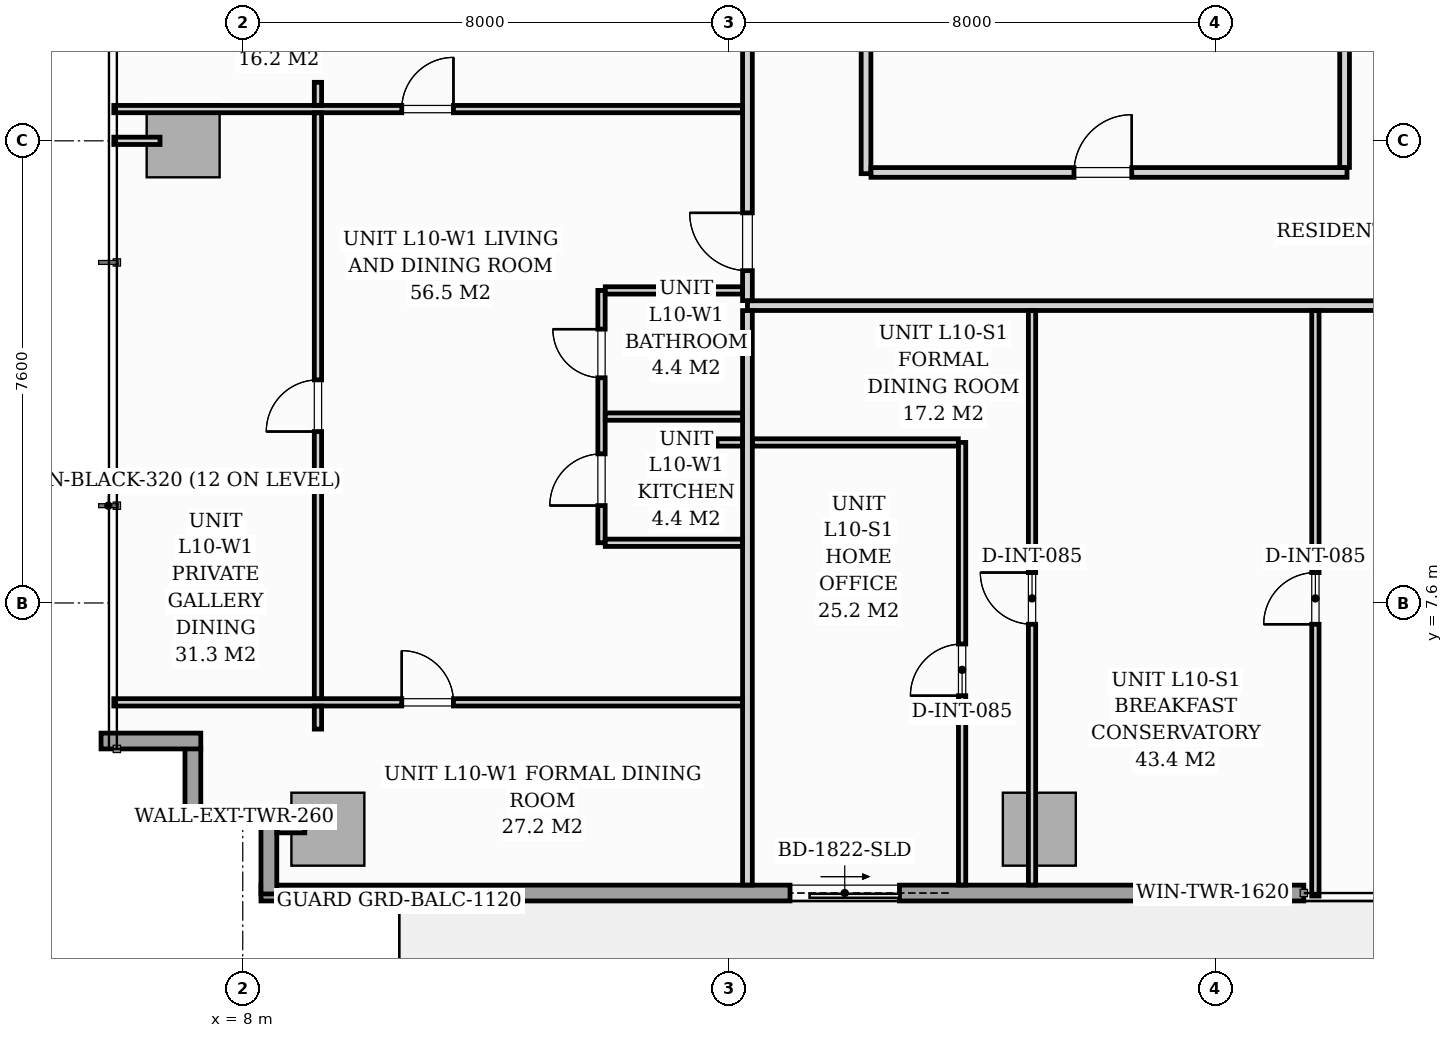
"""IFC4 building model, lengths in metres.
Left out: names, types, materials, properties, quantities, classifications, styles, units other than length and angle.
Written with IfcOpenShell. Run it as: python <this file> out.ifc"""

import sys

from ifc_helpers import new_model, si_unit, direction, frame, frame_2d, origin, origin_2d, place, context, subcontext, project, spatial, rectangle, extrude, source, transform, mapped, element, fill, save


model = new_model("IFC4")
c1 = context("Model", 3, precision=1e-05, world=origin(), true_north=direction((0.0, 1.0)))
c2 = subcontext(c1, "Body", "Model", "MODEL_VIEW")
j1 = project(units=[si_unit("LENGTHUNIT", "METRE"), si_unit("PLANEANGLEUNIT", "RADIAN")], contexts=[c1])
p1 = place(None, origin())
s1 = spatial("IfcSite", under=j1, at=p1, CompositionType="ELEMENT")
p2 = place(p1, origin())
s2 = spatial("IfcBuilding", under=s1, at=p2, CompositionType="ELEMENT")
p3 = place(p2, frame((0.0, 0.0, 39.0)))
s3 = spatial("IfcBuildingStorey", under=s2, at=p3, CompositionType="ELEMENT", Elevation=39.0)
m1 = source(origin(), c2, "Body", "SweptSolid", [
    extrude(rectangle(XDim=1.2, YDim=1.2, at=origin_2d()), origin(), (0.0, 0.0, 1.0), 3.196),
])
for number, where, z_axis, x_axis in (
    (1, (9.4, 3.88, 0.002), (0.0, 0.0, 1.0), (1.0, 0.0, 0.0)),
    (2, (21.1, 3.88, 0.002), (0.0, 0.0, 1.0), (1.0, 0.0, 0.0)),
    (3, (7.02, 15.2, 0.002), (0.0, 0.0, 1.0), (1.0, 0.0, 0.0)),
):
    element("IfcColumn", number, at=place(p3, frame(where, z_axis=z_axis, x_axis=x_axis)), inside=s3, PredefinedType="COLUMN", context=c2, shape_type="MappedRepresentation", body=[
        mapped(m1, transform((0.0, 0.0, 0.0), scale=1.0)),
    ])
p4 = place(p3, frame((8.798, 4.08, 0.0), z_axis=(0.0, 0.0, 1.0), x_axis=(-1.0, 0.0, 0.0)))
e4 = element("IfcWall", 4, at=p4, inside=s3, PredefinedType="STANDARD", context=c2, shape_type="SweptSolid", body=[
    extrude(rectangle(XDim=1.878, YDim=0.26, at=frame_2d((0.939, 0.0))), origin(), (0.0, 0.0, 1.0), 2.94),
])
p5 = place(p3, frame((7.18, 4.065, 0.0), z_axis=(0.0, 0.0, 1.0), x_axis=(0.0, 1.0, 0.0)))
e5 = element("IfcWall", 5, at=p5, inside=s3, PredefinedType="STANDARD", context=c2, shape_type="SweptSolid", body=[
    extrude(rectangle(XDim=1.15, YDim=0.26, at=frame_2d((0.575, 0.0))), origin(), (0.0, 0.0, 1.0), 2.94),
])
p6 = place(p3, frame((7.31, 5.33, 0.0), z_axis=(0.0, 0.0, 1.0), x_axis=(-1.0, 0.0, 0.0)))
e6 = element("IfcWall", 6, at=p6, inside=s3, PredefinedType="STANDARD", context=c2, shape_type="SweptSolid", body=[
    extrude(rectangle(XDim=1.64, YDim=0.26, at=frame_2d((0.82, 0.0))), origin(), (0.0, 0.0, 1.0), 2.94),
])
p7 = place(p3, frame((25.45, 2.83, 0.0), z_axis=(0.0, 0.0, 1.0), x_axis=(-1.0, 0.0, 0.0)))
e7 = element("IfcWall", 7, at=p7, inside=s3, PredefinedType="STANDARD", context=c2, shape_type="SweptSolid", body=[
    extrude(rectangle(XDim=17.15, YDim=0.26, at=frame_2d((8.575, 0.0))), origin(), (0.0, 0.0, 1.0), 2.94),
])
p8 = place(p7, frame((6.65, 0.0, 0.0)))
e8 = element("IfcOpeningElement", 8, at=p8, cuts=e7, PredefinedType="OPENING", context=c2, shape_type="SweptSolid", body=[
    extrude(rectangle(XDim=1.8, YDim=2.06, at=frame_2d((0.9, 1.03))), frame((0.0, 0.14, 0.0), z_axis=(0.0, -1.0, 0.0), x_axis=(1.0, 0.0, 0.0)), (0.0, 0.0, 1.0), 0.28),
])
p9 = place(p7, frame((0.7, 0.0, 0.65)))
e9 = element("IfcOpeningElement", 9, at=p9, cuts=e7, PredefinedType="OPENING", context=c2, shape_type="SweptSolid", body=[
    extrude(rectangle(XDim=1.6, YDim=1.5, at=frame_2d((0.8, 0.75))), frame((0.0, 0.14, 0.0), z_axis=(0.0, -1.0, 0.0), x_axis=(1.0, 0.0, 0.0)), (0.0, 0.0, 1.0), 0.28),
])
p10 = place(p3, frame((8.43, 2.815, 0.0), z_axis=(0.0, 0.0, 1.0), x_axis=(0.0, 1.0, 0.0)))
e10 = element("IfcWall", 10, at=p10, inside=s3, PredefinedType="STANDARD", context=c2, shape_type="SweptSolid", body=[
    extrude(rectangle(XDim=1.395, YDim=0.26, at=frame_2d((0.698, 0.0))), origin(), (0.0, 0.0, 1.0), 2.94),
])
p11 = place(p3, frame((16.3, 12.49, 0.0), z_axis=(0.0, 0.0, 1.0), x_axis=(1.0, 0.0, 0.0)))
e11 = element("IfcWall", 11, at=p11, inside=s3, PredefinedType="PARTITIONING", context=c2, shape_type="SweptSolid", body=[
    extrude(rectangle(XDim=35.2, YDim=0.16, at=frame_2d((17.6, 0.0))), origin(), (0.0, 0.0, 1.0), 2.94),
])
p12 = place(p11, frame((11.072, 0.0, 0.0)))
e12 = element("IfcOpeningElement", 12, at=p12, cuts=e11, PredefinedType="OPENING", context=c2, shape_type="SweptSolid", body=[
    extrude(rectangle(XDim=0.95, YDim=2.06, at=frame_2d((0.475, 1.03))), frame((0.0, 0.09, 0.0), z_axis=(0.0, -1.0, 0.0), x_axis=(1.0, 0.0, 0.0)), (0.0, 0.0, 1.0), 0.18),
])
p13 = place(p11, frame((24.032, 0.0, 0.0)))
e13 = element("IfcOpeningElement", 13, at=p13, cuts=e11, PredefinedType="OPENING", context=c2, shape_type="SweptSolid", body=[
    extrude(rectangle(XDim=0.95, YDim=2.06, at=frame_2d((0.475, 1.03))), frame((0.0, 0.09, 0.0), z_axis=(0.0, -1.0, 0.0), x_axis=(1.0, 0.0, 0.0)), (0.0, 0.0, 1.0), 0.18),
])
p14 = place(p3, frame((16.3, 2.962, 0.0), z_axis=(0.0, 0.0, 1.0), x_axis=(0.0, 1.0, 0.0)))
e14 = element("IfcWall", 14, at=p14, inside=s3, PredefinedType="PARTITIONING", context=c2, shape_type="SweptSolid", body=[
    extrude(rectangle(XDim=9.446, YDim=0.16, at=frame_2d((4.723, 0.0))), origin(), (0.0, 0.0, 1.0), 2.94),
])
p15 = place(p3, frame((16.3, 12.572, 0.0), z_axis=(0.0, 0.0, 1.0), x_axis=(0.0, 1.0, 0.0)))
e15 = element("IfcWall", 15, at=p15, inside=s3, PredefinedType="PARTITIONING", context=c2, shape_type="SweptSolid", body=[
    extrude(rectangle(XDim=14.866, YDim=0.16, at=frame_2d((7.433, 0.0))), origin(), (0.0, 0.0, 1.0), 2.94),
])
p16 = place(p15, frame((0.493, 0.0, 0.0)))
e16 = element("IfcOpeningElement", 16, at=p16, cuts=e15, PredefinedType="OPENING", context=c2, shape_type="SweptSolid", body=[
    extrude(rectangle(XDim=0.95, YDim=2.06, at=frame_2d((0.475, 1.03))), frame((0.0, 0.09, 0.0), z_axis=(0.0, -1.0, 0.0), x_axis=(1.0, 0.0, 0.0)), (0.0, 0.0, 1.0), 0.18),
])
p17 = place(p15, frame((5.473, 0.0, 0.0)))
e17 = element("IfcOpeningElement", 17, at=p17, cuts=e15, PredefinedType="OPENING", context=c2, shape_type="SweptSolid", body=[
    extrude(rectangle(XDim=0.95, YDim=2.06, at=frame_2d((0.475, 1.03))), frame((0.0, 0.09, 0.0), z_axis=(0.0, -1.0, 0.0), x_axis=(1.0, 0.0, 0.0)), (0.0, 0.0, 1.0), 0.18),
])
p18 = place(p3, frame((19.83, 2.962, 0.0), z_axis=(0.0, 0.0, 1.0), x_axis=(0.0, 1.0, 0.0)))
e18 = element("IfcWall", 18, at=p18, inside=s3, PredefinedType="PARTITIONING", context=c2, shape_type="SweptSolid", body=[
    extrude(rectangle(XDim=7.278, YDim=0.12, at=frame_2d((3.639, 0.0))), origin(), (0.0, 0.0, 1.0), 2.94),
])
p19 = place(p18, frame((3.113, 0.0, 0.0)))
e19 = element("IfcOpeningElement", 19, at=p19, cuts=e18, PredefinedType="OPENING", context=c2, shape_type="SweptSolid", body=[
    extrude(rectangle(XDim=0.85, YDim=2.05, at=frame_2d((0.425, 1.025))), frame((0.0, 0.07, 0.0), z_axis=(0.0, -1.0, 0.0), x_axis=(1.0, 0.0, 0.0)), (0.0, 0.0, 1.0), 0.14),
])
p20 = place(p3, frame((15.8, 10.24, 0.0), z_axis=(0.0, 0.0, 1.0), x_axis=(1.0, 0.0, 0.0)))
e20 = element("IfcWall", 20, at=p20, inside=s3, PredefinedType="PARTITIONING", context=c2, shape_type="SweptSolid", body=[
    extrude(rectangle(XDim=0.418, YDim=0.12, at=frame_2d((0.209, 0.0))), origin(), (0.0, 0.0, 1.0), 2.94),
])
p21 = place(p3, frame((16.382, 10.24, 0.0), z_axis=(0.0, 0.0, 1.0), x_axis=(1.0, 0.0, 0.0)))
e21 = element("IfcWall", 21, at=p21, inside=s3, PredefinedType="PARTITIONING", context=c2, shape_type="SweptSolid", body=[
    extrude(rectangle(XDim=3.386, YDim=0.12, at=frame_2d((1.693, 0.0))), origin(), (0.0, 0.0, 1.0), 2.94),
])
p22 = place(p3, frame((20.98, 2.962, 0.0), z_axis=(0.0, 0.0, 1.0), x_axis=(0.0, 1.0, 0.0)))
e22 = element("IfcWall", 22, at=p22, inside=s3, PredefinedType="PARTITIONING", context=c2, shape_type="SweptSolid", body=[
    extrude(rectangle(XDim=9.446, YDim=0.12, at=frame_2d((4.723, 0.0))), origin(), (0.0, 0.0, 1.0), 2.94),
])
p23 = place(p22, frame((4.288, 0.0, 0.0)))
e23 = element("IfcOpeningElement", 23, at=p23, cuts=e22, PredefinedType="OPENING", context=c2, shape_type="SweptSolid", body=[
    extrude(rectangle(XDim=0.85, YDim=2.05, at=frame_2d((0.425, 1.025))), frame((0.0, 0.07, 0.0), z_axis=(0.0, -1.0, 0.0), x_axis=(1.0, 0.0, 0.0)), (0.0, 0.0, 1.0), 0.14),
])
p24 = place(p3, frame((25.64, 2.78, 0.0), z_axis=(0.0, 0.0, 1.0), x_axis=(0.0, 1.0, 0.0)))
e24 = element("IfcWall", 24, at=p24, inside=s3, PredefinedType="PARTITIONING", context=c2, shape_type="SweptSolid", body=[
    extrude(rectangle(XDim=9.628, YDim=0.12, at=frame_2d((4.814, 0.0))), origin(), (0.0, 0.0, 1.0), 2.94),
])
p25 = place(p24, frame((4.47, 0.0, 0.0)))
e25 = element("IfcOpeningElement", 25, at=p25, cuts=e24, PredefinedType="OPENING", context=c2, shape_type="SweptSolid", body=[
    extrude(rectangle(XDim=0.85, YDim=2.05, at=frame_2d((0.425, 1.025))), frame((0.0, 0.07, 0.0), z_axis=(0.0, -1.0, 0.0), x_axis=(1.0, 0.0, 0.0)), (0.0, 0.0, 1.0), 0.14),
])
p26 = place(p3, frame((13.9, 8.59, 0.0), z_axis=(0.0, 0.0, 1.0), x_axis=(0.0, 1.0, 0.0)))
e26 = element("IfcWall", 26, at=p26, inside=s3, PredefinedType="PARTITIONING", context=c2, shape_type="SweptSolid", body=[
    extrude(rectangle(XDim=4.15, YDim=0.12, at=frame_2d((2.075, 0.0))), origin(), (0.0, 0.0, 1.0), 2.94),
])
p27 = place(p26, frame((0.612, 0.0, 0.0)))
e27 = element("IfcOpeningElement", 27, at=p27, cuts=e26, PredefinedType="OPENING", context=c2, shape_type="SweptSolid", body=[
    extrude(rectangle(XDim=0.85, YDim=2.05, at=frame_2d((0.425, 1.025))), frame((0.0, 0.07, 0.0), z_axis=(0.0, -1.0, 0.0), x_axis=(1.0, 0.0, 0.0)), (0.0, 0.0, 1.0), 0.14),
])
p28 = place(p26, frame((2.713, 0.0, 0.0)))
e28 = element("IfcOpeningElement", 28, at=p28, cuts=e26, PredefinedType="OPENING", context=c2, shape_type="SweptSolid", body=[
    extrude(rectangle(XDim=0.8, YDim=2.02, at=frame_2d((0.4, 1.01))), frame((0.0, 0.07, 0.0), z_axis=(0.0, -1.0, 0.0), x_axis=(1.0, 0.0, 0.0)), (0.0, 0.0, 1.0), 0.14),
])
for number, where, z_axis, x_axis in (
    (29, (13.962, 10.665, 0.0), (0.0, 0.0, 1.0), (1.0, 0.0, 0.0)),
    (30, (13.962, 8.59, 0.0), (0.0, 0.0, 1.0), (1.0, 0.0, 0.0)),
    (31, (13.962, 12.74, 0.0), (0.0, 0.0, 1.0), (1.0, 0.0, 0.0)),
):
    element("IfcWall", number, at=place(p3, frame(where, z_axis=z_axis, x_axis=x_axis)), inside=s3, PredefinedType="PARTITIONING", context=c2, shape_type="SweptSolid", body=[
        extrude(rectangle(XDim=2.256, YDim=0.12, at=frame_2d((1.128, 0.0))), origin(), (0.0, 0.0, 1.0), 2.94),
    ])
p29 = place(p3, frame((5.88, 5.966, 0.0), z_axis=(0.0, 0.0, 1.0), x_axis=(1.0, 0.0, 0.0)))
e32 = element("IfcWall", 32, at=p29, inside=s3, PredefinedType="PARTITIONING", context=c2, shape_type="SweptSolid", body=[
    extrude(rectangle(XDim=10.338, YDim=0.12, at=frame_2d((5.169, 0.0))), origin(), (0.0, 0.0, 1.0), 2.94),
])
p30 = place(p29, frame((4.735, 0.0, 0.0)))
e33 = element("IfcOpeningElement", 33, at=p30, cuts=e32, PredefinedType="OPENING", context=c2, shape_type="SweptSolid", body=[
    extrude(rectangle(XDim=0.85, YDim=2.05, at=frame_2d((0.425, 1.025))), frame((0.0, 0.07, 0.0), z_axis=(0.0, -1.0, 0.0), x_axis=(1.0, 0.0, 0.0)), (0.0, 0.0, 1.0), 0.14),
])
p31 = place(p3, frame((5.88, 15.722, 0.0), z_axis=(0.0, 0.0, 1.0), x_axis=(1.0, 0.0, 0.0)))
e34 = element("IfcWall", 34, at=p31, inside=s3, PredefinedType="PARTITIONING", context=c2, shape_type="SweptSolid", body=[
    extrude(rectangle(XDim=10.338, YDim=0.12, at=frame_2d((5.169, 0.0))), origin(), (0.0, 0.0, 1.0), 2.045),
])
p32 = place(p31, frame((4.735, 0.0, 0.0)))
e35 = element("IfcOpeningElement", 35, at=p32, cuts=e34, PredefinedType="OPENING", context=c2, shape_type="SweptSolid", body=[
    extrude(rectangle(XDim=0.85, YDim=2.01, at=frame_2d((0.425, 1.005))), frame((0.0, 0.07, 0.0), z_axis=(0.0, -1.0, 0.0), x_axis=(1.0, 0.0, 0.0)), (0.0, 0.0, 1.0), 0.14),
])
p33 = place(p3, frame((9.237, 5.526, 0.0), z_axis=(0.0, 0.0, 1.0), x_axis=(0.0, 1.0, 0.0)))
e36 = element("IfcWall", 36, at=p33, inside=s3, PredefinedType="PARTITIONING", context=c2, shape_type="SweptSolid", body=[
    extrude(rectangle(XDim=0.378, YDim=0.12, at=frame_2d((0.189, 0.0))), origin(), (0.0, 0.0, 1.0), 2.94),
])
p34 = place(p3, frame((9.237, 6.028, 0.0), z_axis=(0.0, 0.0, 1.0), x_axis=(0.0, 1.0, 0.0)))
e37 = element("IfcWall", 37, at=p34, inside=s3, PredefinedType="PARTITIONING", context=c2, shape_type="SweptSolid", body=[
    extrude(rectangle(XDim=9.632, YDim=0.12, at=frame_2d((4.816, 0.0))), origin(), (0.0, 0.0, 1.0), 2.94),
])
p35 = place(p34, frame((4.391, 0.0, 0.0)))
e38 = element("IfcOpeningElement", 38, at=p35, cuts=e37, PredefinedType="OPENING", context=c2, shape_type="SweptSolid", body=[
    extrude(rectangle(XDim=0.85, YDim=2.05, at=frame_2d((0.425, 1.025))), frame((0.0, 0.07, 0.0), z_axis=(0.0, -1.0, 0.0), x_axis=(1.0, 0.0, 0.0)), (0.0, 0.0, 1.0), 0.14),
])
p36 = place(p3, frame((9.237, 15.784, 0.0), z_axis=(0.0, 0.0, 1.0), x_axis=(0.0, 1.0, 0.0)))
e39 = element("IfcWall", 39, at=p36, inside=s3, PredefinedType="PARTITIONING", context=c2, shape_type="SweptSolid", body=[
    extrude(rectangle(XDim=0.378, YDim=0.12, at=frame_2d((0.189, 0.0))), origin(), (0.0, 0.0, 1.0), 2.94),
])
p37 = place(p3, frame((18.25, 14.66, 0.0), z_axis=(0.0, 0.0, 1.0), x_axis=(0.0, 1.0, 0.0)))
e40 = element("IfcWall", 40, at=p37, inside=s3, PredefinedType="PARTITIONING", context=c2, shape_type="SweptSolid", body=[
    extrude(rectangle(XDim=5.99, YDim=0.16, at=frame_2d((2.995, 0.0))), origin(), (0.0, 0.0, 1.0), 2.94),
])
p38 = place(p3, frame((18.332, 14.68, 0.0), z_axis=(0.0, 0.0, 1.0), x_axis=(1.0, 0.0, 0.0)))
e41 = element("IfcWall", 41, at=p38, inside=s3, PredefinedType="PARTITIONING", context=c2, shape_type="SweptSolid", body=[
    extrude(rectangle(XDim=7.828, YDim=0.16, at=frame_2d((3.914, 0.0))), origin(), (0.0, 0.0, 1.0), 2.94),
])
p39 = place(p38, frame((3.338, 0.0, 0.0)))
e42 = element("IfcOpeningElement", 42, at=p39, cuts=e41, PredefinedType="OPENING", context=c2, shape_type="SweptSolid", body=[
    extrude(rectangle(XDim=0.95, YDim=2.06, at=frame_2d((0.475, 1.03))), frame((0.0, 0.09, 0.0), z_axis=(0.0, -1.0, 0.0), x_axis=(1.0, 0.0, 0.0)), (0.0, 0.0, 1.0), 0.18),
])
p40 = place(p3, frame((26.12, 14.762, 0.0), z_axis=(0.0, 0.0, 1.0), x_axis=(0.0, 1.0, 0.0)))
e43 = element("IfcWall", 43, at=p40, inside=s3, PredefinedType="PARTITIONING", context=c2, shape_type="SweptSolid", body=[
    extrude(rectangle(XDim=2.236, YDim=0.16, at=frame_2d((1.118, 0.0))), origin(), (0.0, 0.0, 1.0), 2.94),
])
p41 = place(p3, frame((9.02, 3.88, 0.0), z_axis=(0.0, 0.0, 1.0), x_axis=(-1.0, 0.0, 0.0)))
e44 = element("IfcWall", 44, at=p41, inside=s3, PredefinedType="PARTITIONING", context=c2, shape_type="SweptSolid", body=[
    extrude(rectangle(XDim=0.458, YDim=0.12, at=frame_2d((0.229, 0.0))), origin(), (0.0, 0.0, 1.0), 2.94),
])
p42 = place(p3, frame((6.64, 15.2, 0.0), z_axis=(0.0, 0.0, 1.0), x_axis=(-1.0, 0.0, 0.0)))
e45 = element("IfcWall", 45, at=p42, inside=s3, PredefinedType="PARTITIONING", context=c2, shape_type="SweptSolid", body=[
    extrude(rectangle(XDim=0.76, YDim=0.12, at=frame_2d((0.38, 0.0))), origin(), (0.0, 0.0, 1.0), 2.94),
])
m2 = source(origin(), c2, "Body", "SweptSolid", [
    extrude(rectangle(XDim=1.8, YDim=2.06, at=frame_2d((0.9, 1.03))), frame((0.0, 0.025, 0.0), z_axis=(0.0, -1.0, 0.0), x_axis=(1.0, 0.0, 0.0)), (0.0, 0.0, 1.0), 0.05),
])
p43 = place(p8, origin())
e46 = element("IfcDoor", 46, at=p43, inside=s3, OperationType="SLIDING_TO_LEFT", PredefinedType="DOOR", context=c2, shape_type="MappedRepresentation", body=[
    mapped(m2, transform((0.0, 0.0, 0.0), scale=1.0)),
])
fill(e8, e46)
m3 = source(origin(), c2, "Body", "SweptSolid", [
    extrude(rectangle(XDim=1.6, YDim=1.5, at=frame_2d((0.8, 0.75))), frame((0.0, 0.03, 0.0), z_axis=(0.0, -1.0, 0.0), x_axis=(1.0, 0.0, 0.0)), (0.0, 0.0, 1.0), 0.06),
])
p44 = place(p9, origin())
e47 = element("IfcWindow", 47, at=p44, inside=s3, PartitioningType="SINGLE_PANEL", PredefinedType="WINDOW", context=c2, shape_type="MappedRepresentation", body=[
    mapped(m3, transform((0.0, 0.0, 0.0), scale=1.0)),
])
fill(e9, e47)
m4 = source(origin(), c2, "Body", "SweptSolid", [
    extrude(rectangle(XDim=0.85, YDim=2.05, at=frame_2d((0.425, 1.025))), frame((0.0, 0.025, 0.0), z_axis=(0.0, -1.0, 0.0), x_axis=(1.0, 0.0, 0.0)), (0.0, 0.0, 1.0), 0.05),
])
p45 = place(p19, origin())
e48 = element("IfcDoor", 48, at=p45, inside=s3, OperationType="SINGLE_SWING_LEFT", PredefinedType="DOOR", context=c2, shape_type="MappedRepresentation", body=[
    mapped(m4, transform((0.0, 0.0, 0.0), scale=1.0)),
])
fill(e19, e48)
p46 = place(p23, origin())
e49 = element("IfcDoor", 49, at=p46, inside=s3, OperationType="SINGLE_SWING_RIGHT", PredefinedType="DOOR", context=c2, shape_type="MappedRepresentation", body=[
    mapped(m4, transform((0.0, 0.0, 0.0), scale=1.0)),
])
fill(e23, e49)
p47 = place(p25, origin())
e50 = element("IfcDoor", 50, at=p47, inside=s3, OperationType="SINGLE_SWING_LEFT", PredefinedType="DOOR", context=c2, shape_type="MappedRepresentation", body=[
    mapped(m4, transform((0.0, 0.0, 0.0), scale=1.0)),
])
fill(e25, e50)
m5 = source(origin(), c2, "Body", "SweptSolid", [
    extrude(rectangle(XDim=0.95, YDim=2.06, at=frame_2d((0.475, 1.03))), frame((0.0, 0.025, 0.0), z_axis=(0.0, -1.0, 0.0), x_axis=(1.0, 0.0, 0.0)), (0.0, 0.0, 1.0), 0.05),
])
p48 = place(p16, origin())
e51 = element("IfcDoor", 51, at=p48, inside=s3, OperationType="SINGLE_SWING_RIGHT", PredefinedType="DOOR", context=c2, shape_type="MappedRepresentation", body=[
    mapped(m5, transform((0.0, 0.0, 0.0), scale=1.0)),
])
fill(e16, e51)
p49 = place(p27, origin())
e52 = element("IfcDoor", 52, at=p49, inside=s3, OperationType="SINGLE_SWING_LEFT", PredefinedType="DOOR", context=c2, shape_type="MappedRepresentation", body=[
    mapped(m4, transform((0.0, 0.0, 0.0), scale=1.0)),
])
fill(e27, e52)
m6 = source(origin(), c2, "Body", "SweptSolid", [
    extrude(rectangle(XDim=0.8, YDim=2.02, at=frame_2d((0.4, 1.01))), frame((0.0, 0.025, 0.0), z_axis=(0.0, -1.0, 0.0), x_axis=(1.0, 0.0, 0.0)), (0.0, 0.0, 1.0), 0.05),
])
p50 = place(p28, origin())
e53 = element("IfcDoor", 53, at=p50, inside=s3, OperationType="SINGLE_SWING_RIGHT", PredefinedType="DOOR", context=c2, shape_type="MappedRepresentation", body=[
    mapped(m6, transform((0.0, 0.0, 0.0), scale=1.0)),
])
fill(e28, e53)
p51 = place(p30, origin())
e54 = element("IfcDoor", 54, at=p51, inside=s3, OperationType="SINGLE_SWING_LEFT", PredefinedType="DOOR", context=c2, shape_type="MappedRepresentation", body=[
    mapped(m4, transform((0.0, 0.0, 0.0), scale=1.0)),
])
fill(e33, e54)
m7 = source(origin(), c2, "Body", "SweptSolid", [
    extrude(rectangle(XDim=0.85, YDim=2.01, at=frame_2d((0.425, 1.005))), frame((0.0, 0.025, 0.0), z_axis=(0.0, -1.0, 0.0), x_axis=(1.0, 0.0, 0.0)), (0.0, 0.0, 1.0), 0.05),
])
p52 = place(p32, origin())
e55 = element("IfcDoor", 55, at=p52, inside=s3, OperationType="SINGLE_SWING_RIGHT", PredefinedType="DOOR", context=c2, shape_type="MappedRepresentation", body=[
    mapped(m7, transform((0.0, 0.0, 0.0), scale=1.0)),
])
fill(e35, e55)
p53 = place(p35, origin())
e56 = element("IfcDoor", 56, at=p53, inside=s3, OperationType="SINGLE_SWING_LEFT", PredefinedType="DOOR", context=c2, shape_type="MappedRepresentation", body=[
    mapped(m4, transform((0.0, 0.0, 0.0), scale=1.0)),
])
fill(e38, e56)
p54 = place(p39, origin())
e57 = element("IfcDoor", 57, at=p54, inside=s3, OperationType="SINGLE_SWING_RIGHT", PredefinedType="DOOR", context=c2, shape_type="MappedRepresentation", body=[
    mapped(m5, transform((0.0, 0.0, 0.0), scale=1.0)),
])
fill(e42, e57)
save(model, sys.argv[1])
